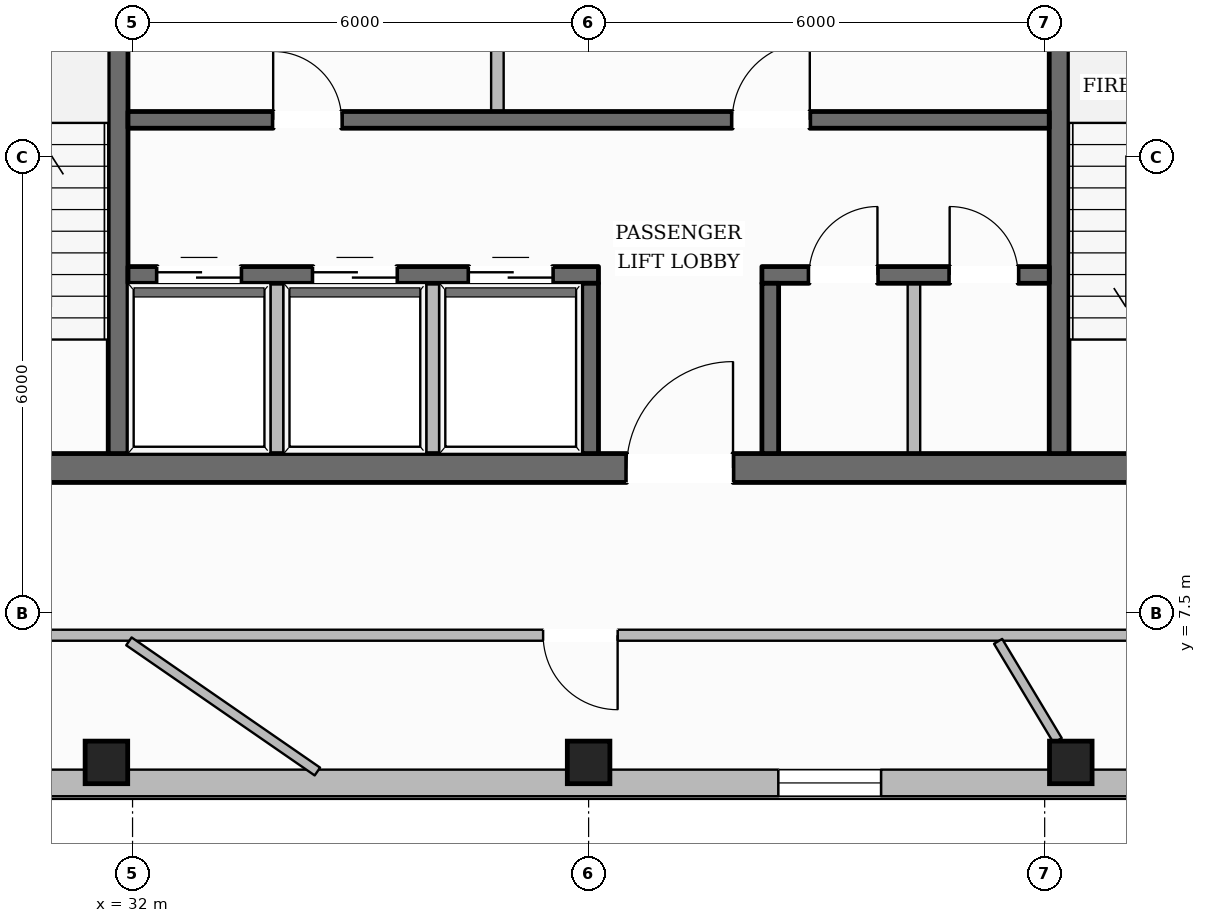
"""IFC4 building model, lengths in metres.
Left out: names, types, materials, properties, quantities, classifications, styles, units other than length and angle.
Written with IfcOpenShell. Run it as: python <this file> out.ifc"""

import sys

from ifc_helpers import new_model, si_unit, direction, frame, frame_2d, origin, origin_2d, place, context, subcontext, project, spatial, rectangle, hollow_rectangle, extrude, element, fill, save


model = new_model("IFC4")
c1 = context("Model", 3, precision=1e-05, world=origin(), true_north=direction((0.0, 1.0)))
c2 = subcontext(c1, "Body", "Model", "MODEL_VIEW")
j1 = project(units=[si_unit("LENGTHUNIT", "METRE"), si_unit("PLANEANGLEUNIT", "RADIAN")], contexts=[c1])
p1 = place(None, origin())
s1 = spatial("IfcSite", under=j1, at=p1, CompositionType="ELEMENT")
p2 = place(p1, origin())
s2 = spatial("IfcBuilding", under=s1, at=p2, CompositionType="ELEMENT")
p3 = place(p2, frame((0.0, 0.0, 274.15)))
s3 = spatial("IfcBuildingStorey", under=s2, at=p3, CompositionType="ELEMENT", Elevation=274.15)
p4 = place(p3, frame((28.1, 9.41, 0.0), z_axis=(0.0, 0.0, 1.0), x_axis=(1.0, 0.0, 0.0)))
e1 = element("IfcWall", 1, at=p4, inside=s3, PredefinedType="SOLIDWALL", context=c2, shape_type="SweptSolid", body=[
    extrude(rectangle(XDim=19.8, YDim=0.38, at=frame_2d((9.9, 0.0))), origin(), (0.0, 0.0, 1.0), 3.61),
])
p5 = place(p4, frame((10.4, 0.0, 0.0)))
e2 = element("IfcOpeningElement", 2, at=p5, cuts=e1, PredefinedType="OPENING", context=c2, shape_type="SweptSolid", body=[
    extrude(rectangle(XDim=1.4, YDim=2.2, at=frame_2d((0.7, 1.1))), frame((0.0, 0.2, 0.0), z_axis=(0.0, -1.0, 0.0), x_axis=(1.0, 0.0, 0.0)), (0.0, 0.0, 1.0), 0.4),
])
p6 = place(p3, frame((31.81, 9.6, 0.0), z_axis=(0.0, 0.0, 1.0), x_axis=(0.0, 1.0, 0.0)))
e3 = element("IfcWall", 3, at=p6, inside=s3, PredefinedType="SHEAR", context=c2, shape_type="SweptSolid", body=[
    extrude(rectangle(XDim=13.0, YDim=0.26, at=frame_2d((6.5, 0.0))), origin(), (0.0, 0.0, 1.0), 3.61),
])
p7 = place(p6, frame((10.925, 0.0, 0.0)))
e4 = element("IfcOpeningElement", 4, at=p7, cuts=e3, PredefinedType="OPENING", context=c2, shape_type="SweptSolid", body=[
    extrude(rectangle(XDim=1.25, YDim=2.25, at=frame_2d((0.625, 1.125))), frame((0.0, 0.14, 0.0), z_axis=(0.0, -1.0, 0.0), x_axis=(1.0, 0.0, 0.0)), (0.0, 0.0, 1.0), 0.28),
])
p8 = place(p3, frame((44.19, 9.6, 0.0), z_axis=(0.0, 0.0, 1.0), x_axis=(0.0, 1.0, 0.0)))
e5 = element("IfcWall", 5, at=p8, inside=s3, PredefinedType="SHEAR", context=c2, shape_type="SweptSolid", body=[
    extrude(rectangle(XDim=13.0, YDim=0.26, at=frame_2d((6.5, 0.0))), origin(), (0.0, 0.0, 1.0), 3.61),
])
p9 = place(p8, frame((10.925, 0.0, 0.0)))
e6 = element("IfcOpeningElement", 6, at=p9, cuts=e5, PredefinedType="OPENING", context=c2, shape_type="SweptSolid", body=[
    extrude(rectangle(XDim=1.25, YDim=2.25, at=frame_2d((0.625, 1.125))), frame((0.0, 0.14, 0.0), z_axis=(0.0, -1.0, 0.0), x_axis=(1.0, 0.0, 0.0)), (0.0, 0.0, 1.0), 0.28),
])
p10 = place(p3, frame((31.94, 13.99, 0.0), z_axis=(0.0, 0.0, 1.0), x_axis=(1.0, 0.0, 0.0)))
e7 = element("IfcWall", 7, at=p10, inside=s3, PredefinedType="SOLIDWALL", context=c2, shape_type="SweptSolid", body=[
    extrude(rectangle(XDim=12.12, YDim=0.22, at=frame_2d((6.06, 0.0))), origin(), (0.0, 0.0, 1.0), 3.61),
])
p11 = place(p10, frame((1.91, 0.0, 0.0)))
e8 = element("IfcOpeningElement", 8, at=p11, cuts=e7, PredefinedType="OPENING", context=c2, shape_type="SweptSolid", body=[
    extrude(rectangle(XDim=0.9, YDim=2.1, at=frame_2d((0.45, 1.05))), frame((0.0, 0.12, 0.0), z_axis=(0.0, -1.0, 0.0), x_axis=(1.0, 0.0, 0.0)), (0.0, 0.0, 1.0), 0.24),
])
p12 = place(p10, frame((7.95, 0.0, 0.0)))
e9 = element("IfcOpeningElement", 9, at=p12, cuts=e7, PredefinedType="OPENING", context=c2, shape_type="SweptSolid", body=[
    extrude(rectangle(XDim=1.02, YDim=2.15, at=frame_2d((0.51, 1.075))), frame((0.0, 0.12, 0.0), z_axis=(0.0, -1.0, 0.0), x_axis=(1.0, 0.0, 0.0)), (0.0, 0.0, 1.0), 0.24),
])
p13 = place(p3, frame((31.94, 11.95, 0.0), z_axis=(0.0, 0.0, 1.0), x_axis=(1.0, 0.0, 0.0)))
e10 = element("IfcWall", 10, at=p13, inside=s3, PredefinedType="SOLIDWALL", context=c2, shape_type="SweptSolid", body=[
    extrude(rectangle(XDim=6.19, YDim=0.22, at=frame_2d((3.095, 0.0))), origin(), (0.0, 0.0, 1.0), 3.61),
])
p14 = place(p13, frame((0.385, 0.0, 0.0)))
e11 = element("IfcOpeningElement", 11, at=p14, cuts=e10, PredefinedType="OPENING", context=c2, shape_type="SweptSolid", body=[
    extrude(rectangle(XDim=1.1, YDim=2.2, at=frame_2d((0.55, 1.1))), frame((0.0, 0.12, 0.0), z_axis=(0.0, -1.0, 0.0), x_axis=(1.0, 0.0, 0.0)), (0.0, 0.0, 1.0), 0.24),
])
p15 = place(p13, frame((2.435, 0.0, 0.0)))
e12 = element("IfcOpeningElement", 12, at=p15, cuts=e10, PredefinedType="OPENING", context=c2, shape_type="SweptSolid", body=[
    extrude(rectangle(XDim=1.1, YDim=2.2, at=frame_2d((0.55, 1.1))), frame((0.0, 0.12, 0.0), z_axis=(0.0, -1.0, 0.0), x_axis=(1.0, 0.0, 0.0)), (0.0, 0.0, 1.0), 0.24),
])
p16 = place(p13, frame((4.485, 0.0, 0.0)))
e13 = element("IfcOpeningElement", 13, at=p16, cuts=e10, PredefinedType="OPENING", context=c2, shape_type="SweptSolid", body=[
    extrude(rectangle(XDim=1.1, YDim=2.2, at=frame_2d((0.55, 1.1))), frame((0.0, 0.12, 0.0), z_axis=(0.0, -1.0, 0.0), x_axis=(1.0, 0.0, 0.0)), (0.0, 0.0, 1.0), 0.24),
])
p17 = place(p3, frame((40.28, 11.95, 0.0), z_axis=(0.0, 0.0, 1.0), x_axis=(1.0, 0.0, 0.0)))
e14 = element("IfcWall", 14, at=p17, inside=s3, PredefinedType="SOLIDWALL", context=c2, shape_type="SweptSolid", body=[
    extrude(rectangle(XDim=3.78, YDim=0.22, at=frame_2d((1.89, 0.0))), origin(), (0.0, 0.0, 1.0), 3.61),
])
p18 = place(p17, frame((0.62, 0.0, 0.0)))
e15 = element("IfcOpeningElement", 15, at=p18, cuts=e14, PredefinedType="OPENING", context=c2, shape_type="SweptSolid", body=[
    extrude(rectangle(XDim=0.9, YDim=2.1, at=frame_2d((0.45, 1.05))), frame((0.0, 0.12, 0.0), z_axis=(0.0, -1.0, 0.0), x_axis=(1.0, 0.0, 0.0)), (0.0, 0.0, 1.0), 0.24),
])
p19 = place(p17, frame((2.47, 0.0, 0.0)))
e16 = element("IfcOpeningElement", 16, at=p19, cuts=e14, PredefinedType="OPENING", context=c2, shape_type="SweptSolid", body=[
    extrude(rectangle(XDim=0.9, YDim=2.1, at=frame_2d((0.45, 1.05))), frame((0.0, 0.12, 0.0), z_axis=(0.0, -1.0, 0.0), x_axis=(1.0, 0.0, 0.0)), (0.0, 0.0, 1.0), 0.24),
])
for number, where, z_axis, x_axis in (
    (17, (38.02, 9.6, 0.0), (0.0, 0.0, 1.0), (0.0, 1.0, 0.0)),
    (18, (40.39, 9.6, 0.0), (0.0, 0.0, 1.0), (0.0, 1.0, 0.0)),
):
    element("IfcWall", number, at=place(p3, frame(where, z_axis=z_axis, x_axis=x_axis)), inside=s3, PredefinedType="SOLIDWALL", context=c2, shape_type="SweptSolid", body=[
        extrude(rectangle(XDim=2.24, YDim=0.22, at=frame_2d((1.12, 0.0))), origin(), (0.0, 0.0, 1.0), 3.61),
    ])
for number, where, z_axis, x_axis in (
    (19, (31.656, 5.537, 0.0), (0.0, 0.0, 1.0), (1.0, 0.0, 0.0)),
    (20, (38.0, 5.537, 0.0), (0.0, 0.0, 1.0), (1.0, 0.0, 0.0)),
    (21, (44.344, 5.537, 0.0), (0.0, 0.0, 1.0), (1.0, 0.0, 0.0)),
):
    element("IfcColumn", number, at=place(p3, frame(where, z_axis=z_axis, x_axis=x_axis)), inside=s3, PredefinedType="COLUMN", context=c2, shape_type="SweptSolid", body=[
        extrude(hollow_rectangle(XDim=0.56, YDim=0.56, WallThickness=0.025, at=origin_2d()), origin(), (0.0, 0.0, 1.0), 3.61),
    ])
p20 = place(p3, frame((15.485, 10.343, 0.0), z_axis=(0.0, 0.0, 1.0), x_axis=(0.508715156146, 0.860934892955, 0.0)))
e22 = element("IfcWall", 22, at=p20, inside=s3, PredefinedType="STANDARD", context=c2, shape_type="SweptSolid", body=[
    extrude(rectangle(XDim=38.349, YDim=0.35, at=frame_2d((19.175, 0.0))), origin(), (0.0, 0.0, 1.0), 3.196),
])
p21 = place(p20, frame((34.084, 0.0, 0.65)))
e23 = element("IfcOpeningElement", 23, at=p21, cuts=e22, PredefinedType="OPENING", context=c2, shape_type="SweptSolid", body=[
    extrude(rectangle(XDim=1.35, YDim=1.75, at=frame_2d((0.675, 0.875))), frame((0.0, 0.185, 0.0), z_axis=(0.0, -1.0, 0.0), x_axis=(1.0, 0.0, 0.0)), (0.0, 0.0, 1.0), 0.37),
])
p22 = place(p20, frame((27.852, 0.0, 0.65)))
e24 = element("IfcOpeningElement", 24, at=p22, cuts=e22, PredefinedType="OPENING", context=c2, shape_type="SweptSolid", body=[
    extrude(rectangle(XDim=1.35, YDim=1.75, at=frame_2d((0.675, 0.875))), frame((0.0, 0.185, 0.0), z_axis=(0.0, -1.0, 0.0), x_axis=(1.0, 0.0, 0.0)), (0.0, 0.0, 1.0), 0.37),
])
p23 = place(p20, frame((15.388, 0.0, 0.65)))
e25 = element("IfcOpeningElement", 25, at=p23, cuts=e22, PredefinedType="OPENING", context=c2, shape_type="SweptSolid", body=[
    extrude(rectangle(XDim=1.35, YDim=1.75, at=frame_2d((0.675, 0.875))), frame((0.0, 0.185, 0.0), z_axis=(0.0, -1.0, 0.0), x_axis=(1.0, 0.0, 0.0)), (0.0, 0.0, 1.0), 0.37),
])
p24 = place(p20, frame((9.156, 0.0, 0.65)))
e26 = element("IfcOpeningElement", 26, at=p24, cuts=e22, PredefinedType="OPENING", context=c2, shape_type="SweptSolid", body=[
    extrude(rectangle(XDim=1.35, YDim=1.75, at=frame_2d((0.675, 0.875))), frame((0.0, 0.185, 0.0), z_axis=(0.0, -1.0, 0.0), x_axis=(1.0, 0.0, 0.0)), (0.0, 0.0, 1.0), 0.37),
])
p25 = place(p20, frame((2.925, 0.0, 0.65)))
e27 = element("IfcOpeningElement", 27, at=p25, cuts=e22, PredefinedType="OPENING", context=c2, shape_type="SweptSolid", body=[
    extrude(rectangle(XDim=1.35, YDim=1.75, at=frame_2d((0.675, 0.875))), frame((0.0, 0.185, 0.0), z_axis=(0.0, -1.0, 0.0), x_axis=(1.0, 0.0, 0.0)), (0.0, 0.0, 1.0), 0.37),
])
p26 = place(p3, frame((57.505, 5.267, 0.0), z_axis=(0.0, 0.0, 1.0), x_axis=(-1.0, 0.0, 0.0)))
e28 = element("IfcWall", 28, at=p26, inside=s3, PredefinedType="STANDARD", context=c2, shape_type="SweptSolid", body=[
    extrude(rectangle(XDim=39.011, YDim=0.35, at=frame_2d((19.505, 0.0))), origin(), (0.0, 0.0, 1.0), 3.196),
])
p27 = place(p26, frame((34.69, 0.0, 0.65)))
e29 = element("IfcOpeningElement", 29, at=p27, cuts=e28, PredefinedType="OPENING", context=c2, shape_type="SweptSolid", body=[
    extrude(rectangle(XDim=1.35, YDim=1.75, at=frame_2d((0.675, 0.875))), frame((0.0, 0.185, 0.0), z_axis=(0.0, -1.0, 0.0), x_axis=(1.0, 0.0, 0.0)), (0.0, 0.0, 1.0), 0.37),
])
p28 = place(p26, frame((28.346, 0.0, 0.65)))
e30 = element("IfcOpeningElement", 30, at=p28, cuts=e28, PredefinedType="OPENING", context=c2, shape_type="SweptSolid", body=[
    extrude(rectangle(XDim=1.35, YDim=1.75, at=frame_2d((0.675, 0.875))), frame((0.0, 0.185, 0.0), z_axis=(0.0, -1.0, 0.0), x_axis=(1.0, 0.0, 0.0)), (0.0, 0.0, 1.0), 0.37),
])
p29 = place(p26, frame((15.658, 0.0, 0.65)))
e31 = element("IfcOpeningElement", 31, at=p29, cuts=e28, PredefinedType="OPENING", context=c2, shape_type="SweptSolid", body=[
    extrude(rectangle(XDim=1.35, YDim=1.75, at=frame_2d((0.675, 0.875))), frame((0.0, 0.185, 0.0), z_axis=(0.0, -1.0, 0.0), x_axis=(1.0, 0.0, 0.0)), (0.0, 0.0, 1.0), 0.37),
])
p30 = place(p26, frame((9.315, 0.0, 0.65)))
e32 = element("IfcOpeningElement", 32, at=p30, cuts=e28, PredefinedType="OPENING", context=c2, shape_type="SweptSolid", body=[
    extrude(rectangle(XDim=1.35, YDim=1.75, at=frame_2d((0.675, 0.875))), frame((0.0, 0.185, 0.0), z_axis=(0.0, -1.0, 0.0), x_axis=(1.0, 0.0, 0.0)), (0.0, 0.0, 1.0), 0.37),
])
p31 = place(p26, frame((2.971, 0.0, 0.65)))
e33 = element("IfcOpeningElement", 33, at=p31, cuts=e28, PredefinedType="OPENING", context=c2, shape_type="SweptSolid", body=[
    extrude(rectangle(XDim=1.35, YDim=1.75, at=frame_2d((0.675, 0.875))), frame((0.0, 0.185, 0.0), z_axis=(0.0, -1.0, 0.0), x_axis=(1.0, 0.0, 0.0)), (0.0, 0.0, 1.0), 0.37),
])
p32 = place(p3, frame((41.006, 43.359, 0.0), z_axis=(0.0, 0.0, 1.0), x_axis=(0.508715156146, -0.860934892955, 0.0)))
e34 = element("IfcWall", 34, at=p32, inside=s3, PredefinedType="STANDARD", context=c2, shape_type="SweptSolid", body=[
    extrude(rectangle(XDim=38.349, YDim=0.35, at=frame_2d((19.175, 0.0))), origin(), (0.0, 0.0, 1.0), 3.196),
])
p33 = place(p32, frame((34.074, 0.0, 0.65)))
e35 = element("IfcOpeningElement", 35, at=p33, cuts=e34, PredefinedType="OPENING", context=c2, shape_type="SweptSolid", body=[
    extrude(rectangle(XDim=1.35, YDim=1.75, at=frame_2d((0.675, 0.875))), frame((0.0, 0.185, 0.0), z_axis=(0.0, -1.0, 0.0), x_axis=(1.0, 0.0, 0.0)), (0.0, 0.0, 1.0), 0.37),
])
p34 = place(p32, frame((27.843, 0.0, 0.65)))
e36 = element("IfcOpeningElement", 36, at=p34, cuts=e34, PredefinedType="OPENING", context=c2, shape_type="SweptSolid", body=[
    extrude(rectangle(XDim=1.35, YDim=1.75, at=frame_2d((0.675, 0.875))), frame((0.0, 0.185, 0.0), z_axis=(0.0, -1.0, 0.0), x_axis=(1.0, 0.0, 0.0)), (0.0, 0.0, 1.0), 0.37),
])
p35 = place(p32, frame((15.379, 0.0, 0.65)))
e37 = element("IfcOpeningElement", 37, at=p35, cuts=e34, PredefinedType="OPENING", context=c2, shape_type="SweptSolid", body=[
    extrude(rectangle(XDim=1.35, YDim=1.75, at=frame_2d((0.675, 0.875))), frame((0.0, 0.185, 0.0), z_axis=(0.0, -1.0, 0.0), x_axis=(1.0, 0.0, 0.0)), (0.0, 0.0, 1.0), 0.37),
])
p36 = place(p32, frame((9.147, 0.0, 0.65)))
e38 = element("IfcOpeningElement", 38, at=p36, cuts=e34, PredefinedType="OPENING", context=c2, shape_type="SweptSolid", body=[
    extrude(rectangle(XDim=1.35, YDim=1.75, at=frame_2d((0.675, 0.875))), frame((0.0, 0.185, 0.0), z_axis=(0.0, -1.0, 0.0), x_axis=(1.0, 0.0, 0.0)), (0.0, 0.0, 1.0), 0.37),
])
p37 = place(p32, frame((2.915, 0.0, 0.65)))
e39 = element("IfcOpeningElement", 39, at=p37, cuts=e34, PredefinedType="OPENING", context=c2, shape_type="SweptSolid", body=[
    extrude(rectangle(XDim=1.35, YDim=1.75, at=frame_2d((0.675, 0.875))), frame((0.0, 0.185, 0.0), z_axis=(0.0, -1.0, 0.0), x_axis=(1.0, 0.0, 0.0)), (0.0, 0.0, 1.0), 0.37),
])
for number, where, z_axis, x_axis in (
    (40, (33.9, 9.49, 0.0), (0.0, 0.0, 1.0), (0.0, 1.0, 0.0)),
    (41, (35.95, 9.49, 0.0), (0.0, 0.0, 1.0), (0.0, 1.0, 0.0)),
):
    element("IfcWall", number, at=place(p3, frame(where, z_axis=z_axis, x_axis=x_axis)), inside=s3, PredefinedType="PARTITIONING", context=c2, shape_type="SweptSolid", body=[
        extrude(rectangle(XDim=2.35, YDim=0.165, at=frame_2d((1.175, 0.0))), origin(), (0.0, 0.0, 1.0), 3.61),
    ])
p38 = place(p3, frame((36.8, 14.1, 0.0), z_axis=(0.0, 0.0, 1.0), x_axis=(0.0, 1.0, 0.0)))
e42 = element("IfcWall", 42, at=p38, inside=s3, PredefinedType="PARTITIONING", context=c2, shape_type="SweptSolid", body=[
    extrude(rectangle(XDim=2.24, YDim=0.165, at=frame_2d((1.12, 0.0))), origin(), (0.0, 0.0, 1.0), 3.61),
])
p39 = place(p3, frame((42.28, 9.49, 0.0), z_axis=(0.0, 0.0, 1.0), x_axis=(0.0, 1.0, 0.0)))
e43 = element("IfcWall", 43, at=p39, inside=s3, PredefinedType="PARTITIONING", context=c2, shape_type="SweptSolid", body=[
    extrude(rectangle(XDim=2.35, YDim=0.165, at=frame_2d((1.175, 0.0))), origin(), (0.0, 0.0, 1.0), 3.61),
])
p40 = place(p3, frame((49.91, 7.21, 0.0), z_axis=(0.0, 0.0, 1.0), x_axis=(-1.0, 0.0, 0.0)))
e44 = element("IfcWall", 44, at=p40, inside=s3, PredefinedType="PARTITIONING", context=c2, shape_type="SweptSolid", body=[
    extrude(rectangle(XDim=23.82, YDim=0.145, at=frame_2d((11.91, 0.0))), origin(), (0.0, 0.0, 1.0), 3.61),
])
p41 = place(p40, frame((11.528, 0.0, 0.0)))
e45 = element("IfcOpeningElement", 45, at=p41, cuts=e44, PredefinedType="OPENING", context=c2, shape_type="SweptSolid", body=[
    extrude(rectangle(XDim=0.98, YDim=2.15, at=frame_2d((0.49, 1.075))), frame((0.0, 0.083, 0.0), z_axis=(0.0, -1.0, 0.0), x_axis=(1.0, 0.0, 0.0)), (0.0, 0.0, 1.0), 0.165),
])
p42 = place(p40, frame((20.371, 0.0, 0.0)))
e46 = element("IfcOpeningElement", 46, at=p42, cuts=e44, PredefinedType="OPENING", context=c2, shape_type="SweptSolid", body=[
    extrude(rectangle(XDim=0.98, YDim=2.15, at=frame_2d((0.49, 1.075))), frame((0.0, 0.083, 0.0), z_axis=(0.0, -1.0, 0.0), x_axis=(1.0, 0.0, 0.0)), (0.0, 0.0, 1.0), 0.165),
])
p43 = place(p40, frame((2.444, 0.0, 0.0)))
e47 = element("IfcOpeningElement", 47, at=p43, cuts=e44, PredefinedType="OPENING", context=c2, shape_type="SweptSolid", body=[
    extrude(rectangle(XDim=1.4, YDim=2.2, at=frame_2d((0.7, 1.1))), frame((0.0, 0.083, 0.0), z_axis=(0.0, -1.0, 0.0), x_axis=(1.0, 0.0, 0.0)), (0.0, 0.0, 1.0), 0.165),
])
p44 = place(p3, frame((43.387, 7.129, 0.0), z_axis=(0.0, 0.0, 1.0), x_axis=(0.514920310526, -0.857238049673, 0.0)))
e48 = element("IfcWall", 48, at=p44, inside=s3, PredefinedType="PARTITIONING", context=c2, shape_type="SweptSolid", body=[
    extrude(rectangle(XDim=1.522, YDim=0.125, at=frame_2d((0.761, 0.0))), origin(), (0.0, 0.0, 1.0), 3.61),
])
p45 = place(p3, frame((31.952, 7.129, 0.0), z_axis=(0.0, 0.0, 1.0), x_axis=(0.82280128664, -0.568329167564, 0.0)))
e49 = element("IfcWall", 49, at=p45, inside=s3, PredefinedType="PARTITIONING", context=c2, shape_type="SweptSolid", body=[
    extrude(rectangle(XDim=3.013, YDim=0.125, at=frame_2d((1.507, 0.0))), origin(), (0.0, 0.0, 1.0), 3.61),
])
p46 = place(p29, origin())
e50 = element("IfcWindow", 50, at=p46, inside=s3, PartitioningType="SINGLE_PANEL", PredefinedType="WINDOW", context=c2, shape_type="SweptSolid", body=[
    extrude(rectangle(XDim=1.35, YDim=1.75, at=frame_2d((0.675, 0.875))), frame((0.0, 0.03, 0.0), z_axis=(0.0, -1.0, 0.0), x_axis=(1.0, 0.0, 0.0)), (0.0, 0.0, 1.0), 0.06),
])
fill(e31, e50)
p47 = place(p5, origin())
e51 = element("IfcDoor", 51, at=p47, inside=s3, OperationType="SINGLE_SWING_RIGHT", PredefinedType="DOOR", context=c2, shape_type="SweptSolid", body=[
    extrude(rectangle(XDim=1.4, YDim=2.2, at=frame_2d((0.7, 1.1))), frame((0.0, 0.025, 0.0), z_axis=(0.0, -1.0, 0.0), x_axis=(1.0, 0.0, 0.0)), (0.0, 0.0, 1.0), 0.05),
])
fill(e2, e51)
p48 = place(p14, origin())
e52 = element("IfcDoor", 52, at=p48, inside=s3, OperationType="DOUBLE_DOOR_SLIDING", PredefinedType="DOOR", context=c2, shape_type="SweptSolid", body=[
    extrude(rectangle(XDim=1.1, YDim=2.2, at=frame_2d((0.55, 1.1))), frame((0.0, 0.025, 0.0), z_axis=(0.0, -1.0, 0.0), x_axis=(1.0, 0.0, 0.0)), (0.0, 0.0, 1.0), 0.05),
])
fill(e11, e52)
p49 = place(p15, origin())
e53 = element("IfcDoor", 53, at=p49, inside=s3, OperationType="DOUBLE_DOOR_SLIDING", PredefinedType="DOOR", context=c2, shape_type="SweptSolid", body=[
    extrude(rectangle(XDim=1.1, YDim=2.2, at=frame_2d((0.55, 1.1))), frame((0.0, 0.025, 0.0), z_axis=(0.0, -1.0, 0.0), x_axis=(1.0, 0.0, 0.0)), (0.0, 0.0, 1.0), 0.05),
])
fill(e12, e53)
p50 = place(p16, origin())
e54 = element("IfcDoor", 54, at=p50, inside=s3, OperationType="DOUBLE_DOOR_SLIDING", PredefinedType="DOOR", context=c2, shape_type="SweptSolid", body=[
    extrude(rectangle(XDim=1.1, YDim=2.2, at=frame_2d((0.55, 1.1))), frame((0.0, 0.025, 0.0), z_axis=(0.0, -1.0, 0.0), x_axis=(1.0, 0.0, 0.0)), (0.0, 0.0, 1.0), 0.05),
])
fill(e13, e54)
p51 = place(p11, origin())
e55 = element("IfcDoor", 55, at=p51, inside=s3, OperationType="SINGLE_SWING_LEFT", PredefinedType="DOOR", context=c2, shape_type="SweptSolid", body=[
    extrude(rectangle(XDim=0.9, YDim=2.1, at=frame_2d((0.45, 1.05))), frame((0.0, 0.025, 0.0), z_axis=(0.0, -1.0, 0.0), x_axis=(1.0, 0.0, 0.0)), (0.0, 0.0, 1.0), 0.05),
])
fill(e8, e55)
p52 = place(p12, origin())
e56 = element("IfcDoor", 56, at=p52, inside=s3, OperationType="SINGLE_SWING_RIGHT", PredefinedType="DOOR", context=c2, shape_type="SweptSolid", body=[
    extrude(rectangle(XDim=1.02, YDim=2.15, at=frame_2d((0.51, 1.075))), frame((0.0, 0.025, 0.0), z_axis=(0.0, -1.0, 0.0), x_axis=(1.0, 0.0, 0.0)), (0.0, 0.0, 1.0), 0.05),
])
fill(e9, e56)
p53 = place(p18, origin())
e57 = element("IfcDoor", 57, at=p53, inside=s3, OperationType="SINGLE_SWING_RIGHT", PredefinedType="DOOR", context=c2, shape_type="SweptSolid", body=[
    extrude(rectangle(XDim=0.9, YDim=2.1, at=frame_2d((0.45, 1.05))), frame((0.0, 0.025, 0.0), z_axis=(0.0, -1.0, 0.0), x_axis=(1.0, 0.0, 0.0)), (0.0, 0.0, 1.0), 0.05),
])
fill(e15, e57)
p54 = place(p19, origin())
e58 = element("IfcDoor", 58, at=p54, inside=s3, OperationType="SINGLE_SWING_LEFT", PredefinedType="DOOR", context=c2, shape_type="SweptSolid", body=[
    extrude(rectangle(XDim=0.9, YDim=2.1, at=frame_2d((0.45, 1.05))), frame((0.0, 0.025, 0.0), z_axis=(0.0, -1.0, 0.0), x_axis=(1.0, 0.0, 0.0)), (0.0, 0.0, 1.0), 0.05),
])
fill(e16, e58)
p55 = place(p41, origin())
e59 = element("IfcDoor", 59, at=p55, inside=s3, OperationType="SINGLE_SWING_LEFT", PredefinedType="DOOR", context=c2, shape_type="SweptSolid", body=[
    extrude(rectangle(XDim=0.98, YDim=2.15, at=frame_2d((0.49, 1.075))), frame((0.0, 0.025, 0.0), z_axis=(0.0, -1.0, 0.0), x_axis=(1.0, 0.0, 0.0)), (0.0, 0.0, 1.0), 0.05),
])
fill(e45, e59)
save(model, sys.argv[1])
